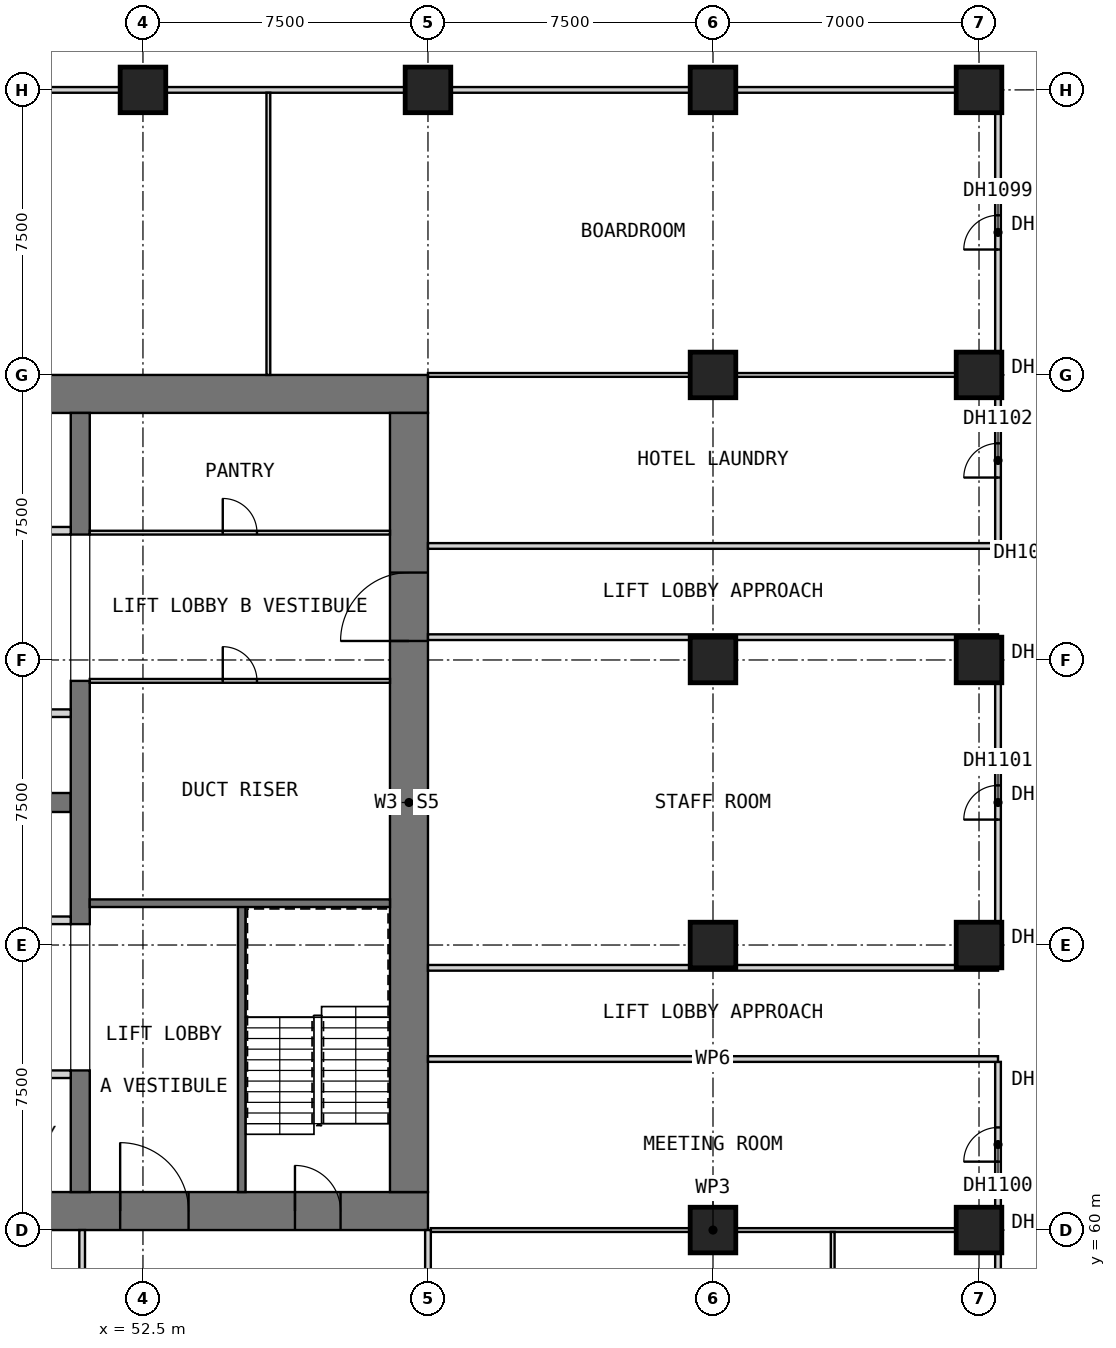
"""IFC4 building model, lengths in metres.
Left out: names, types, materials, properties, quantities, classifications, styles, units other than length and angle.
Written with IfcOpenShell. Run it as: python <this file> out.ifc"""

import sys

from ifc_helpers import new_model, si_unit, direction, frame, frame_2d, origin, origin_2d, place, context, subcontext, project, spatial, rectangle, extrude, element, fill, save


model = new_model("IFC4")
c1 = context("Model", 3, precision=1e-05, world=origin(), true_north=direction((0.0, 1.0)))
c2 = subcontext(c1, "Body", "Model", "MODEL_VIEW")
j1 = project(units=[si_unit("LENGTHUNIT", "METRE"), si_unit("PLANEANGLEUNIT", "RADIAN")], contexts=[c1])
p1 = place(None, origin())
s1 = spatial("IfcSite", under=j1, at=p1, CompositionType="ELEMENT")
p2 = place(p1, origin())
s2 = spatial("IfcBuilding", under=s1, at=p2, CompositionType="ELEMENT")
p3 = place(p2, frame((0.0, 0.0, 48.4)))
s3 = spatial("IfcBuildingStorey", under=s2, at=p3, CompositionType="ELEMENT", Elevation=48.4)
for number, where, z_axis, x_axis in (
    (1, (52.5, 90.0, 0.0), (0.0, 0.0, 1.0), (1.0, 0.0, 0.0)),
    (2, (60.0, 90.0, 0.0), (0.0, 0.0, 1.0), (1.0, 0.0, 0.0)),
    (3, (67.5, 60.0, 0.0), (0.0, 0.0, 1.0), (1.0, 0.0, 0.0)),
    (4, (67.5, 67.5, 0.0), (0.0, 0.0, 1.0), (1.0, 0.0, 0.0)),
    (5, (67.5, 75.0, 0.0), (0.0, 0.0, 1.0), (1.0, 0.0, 0.0)),
    (6, (67.5, 82.5, 0.0), (0.0, 0.0, 1.0), (1.0, 0.0, 0.0)),
    (7, (67.5, 90.0, 0.0), (0.0, 0.0, 1.0), (1.0, 0.0, 0.0)),
    (8, (74.5, 60.0, 0.0), (0.0, 0.0, 1.0), (1.0, 0.0, 0.0)),
    (9, (74.5, 67.5, 0.0), (0.0, 0.0, 1.0), (1.0, 0.0, 0.0)),
    (10, (74.5, 75.0, 0.0), (0.0, 0.0, 1.0), (1.0, 0.0, 0.0)),
    (11, (74.5, 82.5, 0.0), (0.0, 0.0, 1.0), (1.0, 0.0, 0.0)),
    (12, (74.5, 90.0, 0.0), (0.0, 0.0, 1.0), (1.0, 0.0, 0.0)),
):
    element("IfcColumn", number, at=place(p3, frame(where, z_axis=z_axis, x_axis=x_axis)), inside=s3, PredefinedType="COLUMN", context=c2, shape_type="SweptSolid", body=[
        extrude(rectangle(XDim=1.2, YDim=1.2, at=origin_2d()), origin(), (0.0, 0.0, 1.0), 3.6),
    ])
p4 = place(p3, frame((30.0, 60.5, 0.0), z_axis=(0.0, 0.0, 1.0), x_axis=(1.0, 0.0, 0.0)))
e13 = element("IfcWall", 13, at=p4, inside=s3, PredefinedType="SHEAR", context=c2, shape_type="SweptSolid", body=[
    extrude(rectangle(XDim=30.0, YDim=1.0, at=frame_2d((15.0, 0.0))), origin(), (0.0, 0.0, 1.0), 3.6),
])
p5 = place(p4, frame((21.9, 0.0, 0.0)))
e14 = element("IfcOpeningElement", 14, at=p5, cuts=e13, PredefinedType="OPENING", context=c2, shape_type="SweptSolid", body=[
    extrude(rectangle(XDim=1.8, YDim=2.1, at=frame_2d((0.9, 1.05))), frame((0.0, 0.51, 0.0), z_axis=(0.0, -1.0, 0.0), x_axis=(1.0, 0.0, 0.0)), (0.0, 0.0, 1.0), 1.02),
])
p6 = place(p4, frame((26.5, 0.0, 0.0)))
e15 = element("IfcOpeningElement", 15, at=p6, cuts=e13, PredefinedType="OPENING", context=c2, shape_type="SweptSolid", body=[
    extrude(rectangle(XDim=1.2, YDim=2.1, at=frame_2d((0.6, 1.05))), frame((0.0, 0.51, 0.0), z_axis=(0.0, -1.0, 0.0), x_axis=(1.0, 0.0, 0.0)), (0.0, 0.0, 1.0), 1.02),
])
p7 = place(p3, frame((30.0, 82.0, 0.0), z_axis=(0.0, 0.0, 1.0), x_axis=(1.0, 0.0, 0.0)))
e16 = element("IfcWall", 16, at=p7, inside=s3, PredefinedType="SHEAR", context=c2, shape_type="SweptSolid", body=[
    extrude(rectangle(XDim=30.0, YDim=1.0, at=frame_2d((15.0, 0.0))), origin(), (0.0, 0.0, 1.0), 3.6),
])
p8 = place(p3, frame((59.5, 61.0, 0.0), z_axis=(0.0, 0.0, 1.0), x_axis=(0.0, 1.0, 0.0)))
e17 = element("IfcWall", 17, at=p8, inside=s3, PredefinedType="SHEAR", context=c2, shape_type="SweptSolid", body=[
    extrude(rectangle(XDim=20.5, YDim=1.0, at=frame_2d((10.25, 0.0))), origin(), (0.0, 0.0, 1.0), 3.6),
])
p9 = place(p8, frame((14.5, 0.0, 0.0)))
e18 = element("IfcOpeningElement", 18, at=p9, cuts=e17, PredefinedType="OPENING", context=c2, shape_type="SweptSolid", body=[
    extrude(rectangle(XDim=1.8, YDim=2.1, at=frame_2d((0.9, 1.05))), frame((0.0, 0.51, 0.0), z_axis=(0.0, -1.0, 0.0), x_axis=(1.0, 0.0, 0.0)), (0.0, 0.0, 1.0), 1.02),
])
p10 = place(p3, frame((35.0, 71.25, 0.0), z_axis=(0.0, 0.0, 1.0), x_axis=(1.0, 0.0, 0.0)))
e19 = element("IfcWall", 19, at=p10, inside=s3, PredefinedType="SHEAR", context=c2, shape_type="SweptSolid", body=[
    extrude(rectangle(XDim=15.6, YDim=0.5, at=frame_2d((7.8, 0.0))), origin(), (0.0, 0.0, 1.0), 3.6),
])
p11 = place(p3, frame((50.85, 61.0, 0.0), z_axis=(0.0, 0.0, 1.0), x_axis=(0.0, 1.0, 0.0)))
e20 = element("IfcWall", 20, at=p11, inside=s3, PredefinedType="SHEAR", context=c2, shape_type="SweptSolid", body=[
    extrude(rectangle(XDim=3.2, YDim=0.5, at=frame_2d((1.6, 0.0))), origin(), (0.0, 0.0, 1.0), 3.6),
])
p12 = place(p3, frame((50.85, 68.05, 0.0), z_axis=(0.0, 0.0, 1.0), x_axis=(0.0, 1.0, 0.0)))
e21 = element("IfcWall", 21, at=p12, inside=s3, PredefinedType="SHEAR", context=c2, shape_type="SweptSolid", body=[
    extrude(rectangle(XDim=6.4, YDim=0.5, at=frame_2d((3.2, 0.0))), origin(), (0.0, 0.0, 1.0), 3.6),
])
p13 = place(p3, frame((50.85, 78.3, 0.0), z_axis=(0.0, 0.0, 1.0), x_axis=(0.0, 1.0, 0.0)))
e22 = element("IfcWall", 22, at=p13, inside=s3, PredefinedType="SHEAR", context=c2, shape_type="SweptSolid", body=[
    extrude(rectangle(XDim=3.2, YDim=0.5, at=frame_2d((1.6, 0.0))), origin(), (0.0, 0.0, 1.0), 3.6),
])
p14 = place(p3, frame((48.0, 64.1, 0.0), z_axis=(0.0, 0.0, 1.0), x_axis=(1.0, 0.0, 0.0)))
e23 = element("IfcWall", 23, at=p14, inside=s3, PredefinedType="PARTITIONING", context=c2, shape_type="SweptSolid", body=[
    extrude(rectangle(XDim=2.6, YDim=0.2, at=frame_2d((1.3, 0.0))), origin(), (0.0, 0.0, 1.0), 3.35),
])
p15 = place(p14, frame((0.85, 0.0, 0.0)))
e24 = element("IfcOpeningElement", 24, at=p15, cuts=e23, PredefinedType="OPENING", context=c2, shape_type="SweptSolid", body=[
    extrude(rectangle(XDim=0.9, YDim=2.1, at=frame_2d((0.45, 1.05))), frame((0.0, 0.11, 0.0), z_axis=(0.0, -1.0, 0.0), x_axis=(1.0, 0.0, 0.0)), (0.0, 0.0, 1.0), 0.22),
])
p16 = place(p3, frame((48.0, 68.15, 0.0), z_axis=(0.0, 0.0, 1.0), x_axis=(1.0, 0.0, 0.0)))
e25 = element("IfcWall", 25, at=p16, inside=s3, PredefinedType="PARTITIONING", context=c2, shape_type="SweptSolid", body=[
    extrude(rectangle(XDim=2.6, YDim=0.2, at=frame_2d((1.3, 0.0))), origin(), (0.0, 0.0, 1.0), 3.35),
])
p17 = place(p16, frame((0.85, 0.0, 0.0)))
e26 = element("IfcOpeningElement", 26, at=p17, cuts=e25, PredefinedType="OPENING", context=c2, shape_type="SweptSolid", body=[
    extrude(rectangle(XDim=0.9, YDim=2.1, at=frame_2d((0.45, 1.05))), frame((0.0, 0.11, 0.0), z_axis=(0.0, -1.0, 0.0), x_axis=(1.0, 0.0, 0.0)), (0.0, 0.0, 1.0), 0.22),
])
p18 = place(p3, frame((35.0, 73.6, 0.0), z_axis=(0.0, 0.0, 1.0), x_axis=(1.0, 0.0, 0.0)))
e27 = element("IfcWall", 27, at=p18, inside=s3, PredefinedType="PARTITIONING", context=c2, shape_type="SweptSolid", body=[
    extrude(rectangle(XDim=15.6, YDim=0.2, at=frame_2d((7.8, 0.0))), origin(), (0.0, 0.0, 1.0), 3.35),
])
p19 = place(p18, frame((3.45, 0.0, 0.0)))
e28 = element("IfcOpeningElement", 28, at=p19, cuts=e27, PredefinedType="OPENING", context=c2, shape_type="SweptSolid", body=[
    extrude(rectangle(XDim=0.9, YDim=2.1, at=frame_2d((0.45, 1.05))), frame((0.0, 0.11, 0.0), z_axis=(0.0, -1.0, 0.0), x_axis=(1.0, 0.0, 0.0)), (0.0, 0.0, 1.0), 0.22),
])
p20 = place(p18, frame((11.25, 0.0, 0.0)))
e29 = element("IfcOpeningElement", 29, at=p20, cuts=e27, PredefinedType="OPENING", context=c2, shape_type="SweptSolid", body=[
    extrude(rectangle(XDim=0.9, YDim=2.1, at=frame_2d((0.45, 1.05))), frame((0.0, 0.11, 0.0), z_axis=(0.0, -1.0, 0.0), x_axis=(1.0, 0.0, 0.0)), (0.0, 0.0, 1.0), 0.22),
])
p21 = place(p3, frame((35.0, 78.4, 0.0), z_axis=(0.0, 0.0, 1.0), x_axis=(1.0, 0.0, 0.0)))
e30 = element("IfcWall", 30, at=p21, inside=s3, PredefinedType="SOLIDWALL", context=c2, shape_type="SweptSolid", body=[
    extrude(rectangle(XDim=15.6, YDim=0.2, at=frame_2d((7.8, 0.0))), origin(), (0.0, 0.0, 1.0), 3.6),
])
p22 = place(p21, frame((0.75, 0.0, 0.0)))
e31 = element("IfcOpeningElement", 31, at=p22, cuts=e30, PredefinedType="OPENING", context=c2, shape_type="SweptSolid", body=[
    extrude(rectangle(XDim=1.1, YDim=2.1, at=frame_2d((0.55, 1.05))), frame((0.0, 0.11, 0.0), z_axis=(0.0, -1.0, 0.0), x_axis=(1.0, 0.0, 0.0)), (0.0, 0.0, 1.0), 0.22),
])
p23 = place(p21, frame((3.35, 0.0, 0.0)))
e32 = element("IfcOpeningElement", 32, at=p23, cuts=e30, PredefinedType="OPENING", context=c2, shape_type="SweptSolid", body=[
    extrude(rectangle(XDim=1.1, YDim=2.1, at=frame_2d((0.55, 1.05))), frame((0.0, 0.11, 0.0), z_axis=(0.0, -1.0, 0.0), x_axis=(1.0, 0.0, 0.0)), (0.0, 0.0, 1.0), 0.22),
])
p24 = place(p21, frame((11.15, 0.0, 0.0)))
e33 = element("IfcOpeningElement", 33, at=p24, cuts=e30, PredefinedType="OPENING", context=c2, shape_type="SweptSolid", body=[
    extrude(rectangle(XDim=1.1, YDim=2.1, at=frame_2d((0.55, 1.05))), frame((0.0, 0.11, 0.0), z_axis=(0.0, -1.0, 0.0), x_axis=(1.0, 0.0, 0.0)), (0.0, 0.0, 1.0), 0.22),
])
p25 = place(p21, frame((13.75, 0.0, 0.0)))
e34 = element("IfcOpeningElement", 34, at=p25, cuts=e30, PredefinedType="OPENING", context=c2, shape_type="SweptSolid", body=[
    extrude(rectangle(XDim=1.1, YDim=2.1, at=frame_2d((0.55, 1.05))), frame((0.0, 0.11, 0.0), z_axis=(0.0, -1.0, 0.0), x_axis=(1.0, 0.0, 0.0)), (0.0, 0.0, 1.0), 0.22),
])
p26 = place(p3, frame((55.1, 61.0, 0.0), z_axis=(0.0, 0.0, 1.0), x_axis=(0.0, 1.0, 0.0)))
e35 = element("IfcWall", 35, at=p26, inside=s3, PredefinedType="SOLIDWALL", context=c2, shape_type="SweptSolid", body=[
    extrude(rectangle(XDim=7.6, YDim=0.2, at=frame_2d((3.8, 0.0))), origin(), (0.0, 0.0, 1.0), 3.35),
])
p27 = place(p3, frame((51.1, 68.6, 0.0), z_axis=(0.0, 0.0, 1.0), x_axis=(1.0, 0.0, 0.0)))
e36 = element("IfcWall", 36, at=p27, inside=s3, PredefinedType="SOLIDWALL", context=c2, shape_type="SweptSolid", body=[
    extrude(rectangle(XDim=7.9, YDim=0.2, at=frame_2d((3.95, 0.0))), origin(), (0.0, 0.0, 1.0), 3.35),
])
p28 = place(p3, frame((51.1, 74.45, 0.0), z_axis=(0.0, 0.0, 1.0), x_axis=(1.0, 0.0, 0.0)))
e37 = element("IfcWall", 37, at=p28, inside=s3, PredefinedType="PARTITIONING", context=c2, shape_type="SweptSolid", body=[
    extrude(rectangle(XDim=7.9, YDim=0.1, at=frame_2d((3.95, 0.0))), origin(), (0.0, 0.0, 1.0), 3.35),
])
p29 = place(p28, frame((3.5, 0.0, 0.0)))
e38 = element("IfcOpeningElement", 38, at=p29, cuts=e37, PredefinedType="OPENING", context=c2, shape_type="SweptSolid", body=[
    extrude(rectangle(XDim=0.9, YDim=2.1, at=frame_2d((0.45, 1.05))), frame((0.0, 0.06, 0.0), z_axis=(0.0, -1.0, 0.0), x_axis=(1.0, 0.0, 0.0)), (0.0, 0.0, 1.0), 0.12),
])
p30 = place(p3, frame((51.1, 78.35, 0.0), z_axis=(0.0, 0.0, 1.0), x_axis=(1.0, 0.0, 0.0)))
e39 = element("IfcWall", 39, at=p30, inside=s3, PredefinedType="PARTITIONING", context=c2, shape_type="SweptSolid", body=[
    extrude(rectangle(XDim=7.9, YDim=0.1, at=frame_2d((3.95, 0.0))), origin(), (0.0, 0.0, 1.0), 3.35),
])
p31 = place(p30, frame((3.5, 0.0, 0.0)))
e40 = element("IfcOpeningElement", 40, at=p31, cuts=e39, PredefinedType="OPENING", context=c2, shape_type="SweptSolid", body=[
    extrude(rectangle(XDim=0.9, YDim=2.1, at=frame_2d((0.45, 1.05))), frame((0.0, 0.06, 0.0), z_axis=(0.0, -1.0, 0.0), x_axis=(1.0, 0.0, 0.0)), (0.0, 0.0, 1.0), 0.12),
])
p32 = place(p3, frame((33.75, 90.0, 0.0), z_axis=(0.0, 0.0, 1.0), x_axis=(1.0, 0.0, 0.0)))
e41 = element("IfcWall", 41, at=p32, inside=s3, PredefinedType="PARTITIONING", context=c2, shape_type="SweptSolid", body=[
    extrude(rectangle(XDim=41.25, YDim=0.15, at=frame_2d((20.625, 0.0))), origin(), (0.0, 0.0, 1.0), 3.35),
])
p33 = place(p32, frame((1.425, 0.0, 0.0)))
e42 = element("IfcOpeningElement", 42, at=p33, cuts=e41, PredefinedType="OPENING", context=c2, shape_type="SweptSolid", body=[
    extrude(rectangle(XDim=0.9, YDim=2.1, at=frame_2d((0.45, 1.05))), frame((0.0, 0.085, 0.0), z_axis=(0.0, -1.0, 0.0), x_axis=(1.0, 0.0, 0.0)), (0.0, 0.0, 1.0), 0.17),
])
p34 = place(p32, frame((12.45, 0.0, 0.0)))
e43 = element("IfcOpeningElement", 43, at=p34, cuts=e41, PredefinedType="OPENING", context=c2, shape_type="SweptSolid", body=[
    extrude(rectangle(XDim=0.9, YDim=2.1, at=frame_2d((0.45, 1.05))), frame((0.0, 0.085, 0.0), z_axis=(0.0, -1.0, 0.0), x_axis=(1.0, 0.0, 0.0)), (0.0, 0.0, 1.0), 0.17),
])
p35 = place(p3, frame((75.0, 52.575, 0.0), z_axis=(0.0, 0.0, 1.0), x_axis=(0.0, 1.0, 0.0)))
e44 = element("IfcWall", 44, at=p35, inside=s3, PredefinedType="PARTITIONING", context=c2, shape_type="SweptSolid", body=[
    extrude(rectangle(XDim=11.85, YDim=0.15, at=frame_2d((5.925, 0.0))), origin(), (0.0, 0.0, 1.0), 3.35),
])
p36 = place(p35, frame((9.225, 0.0, 0.0)))
e45 = element("IfcOpeningElement", 45, at=p36, cuts=e44, PredefinedType="OPENING", context=c2, shape_type="SweptSolid", body=[
    extrude(rectangle(XDim=0.9, YDim=2.1, at=frame_2d((0.45, 1.05))), frame((0.0, 0.085, 0.0), z_axis=(0.0, -1.0, 0.0), x_axis=(1.0, 0.0, 0.0)), (0.0, 0.0, 1.0), 0.17),
])
p37 = place(p3, frame((75.0, 66.975, 0.0), z_axis=(0.0, 0.0, 1.0), x_axis=(0.0, 1.0, 0.0)))
e46 = element("IfcWall", 46, at=p37, inside=s3, PredefinedType="PARTITIONING", context=c2, shape_type="SweptSolid", body=[
    extrude(rectangle(XDim=8.55, YDim=0.15, at=frame_2d((4.275, 0.0))), origin(), (0.0, 0.0, 1.0), 3.35),
])
p38 = place(p37, frame((3.825, 0.0, 0.0)))
e47 = element("IfcOpeningElement", 47, at=p38, cuts=e46, PredefinedType="OPENING", context=c2, shape_type="SweptSolid", body=[
    extrude(rectangle(XDim=0.9, YDim=2.1, at=frame_2d((0.45, 1.05))), frame((0.0, 0.085, 0.0), z_axis=(0.0, -1.0, 0.0), x_axis=(1.0, 0.0, 0.0)), (0.0, 0.0, 1.0), 0.17),
])
p39 = place(p3, frame((75.0, 78.075, 0.0), z_axis=(0.0, 0.0, 1.0), x_axis=(0.0, 1.0, 0.0)))
e48 = element("IfcWall", 48, at=p39, inside=s3, PredefinedType="PARTITIONING", context=c2, shape_type="SweptSolid", body=[
    extrude(rectangle(XDim=11.85, YDim=0.15, at=frame_2d((5.925, 0.0))), origin(), (0.0, 0.0, 1.0), 3.35),
])
p40 = place(p39, frame((7.725, 0.0, 0.0)))
e49 = element("IfcOpeningElement", 49, at=p40, cuts=e48, PredefinedType="OPENING", context=c2, shape_type="SweptSolid", body=[
    extrude(rectangle(XDim=0.9, YDim=2.1, at=frame_2d((0.45, 1.05))), frame((0.0, 0.085, 0.0), z_axis=(0.0, -1.0, 0.0), x_axis=(1.0, 0.0, 0.0)), (0.0, 0.0, 1.0), 0.17),
])
p41 = place(p39, frame((1.725, 0.0, 0.0)))
e50 = element("IfcOpeningElement", 50, at=p41, cuts=e48, PredefinedType="OPENING", context=c2, shape_type="SweptSolid", body=[
    extrude(rectangle(XDim=0.9, YDim=2.1, at=frame_2d((0.45, 1.05))), frame((0.0, 0.085, 0.0), z_axis=(0.0, -1.0, 0.0), x_axis=(1.0, 0.0, 0.0)), (0.0, 0.0, 1.0), 0.17),
])
p42 = place(p3, frame((60.075, 60.0, 0.0), z_axis=(0.0, 0.0, 1.0), x_axis=(1.0, 0.0, 0.0)))
e51 = element("IfcWall", 51, at=p42, inside=s3, PredefinedType="PARTITIONING", context=c2, shape_type="SweptSolid", body=[
    extrude(rectangle(XDim=14.85, YDim=0.1, at=frame_2d((7.425, 0.0))), origin(), (0.0, 0.0, 1.0), 3.35),
])
p43 = place(p3, frame((60.0, 82.5, 0.0), z_axis=(0.0, 0.0, 1.0), x_axis=(1.0, 0.0, 0.0)))
e52 = element("IfcWall", 52, at=p43, inside=s3, PredefinedType="PARTITIONING", context=c2, shape_type="SweptSolid", body=[
    extrude(rectangle(XDim=14.925, YDim=0.1, at=frame_2d((7.462, 0.0))), origin(), (0.0, 0.0, 1.0), 3.35),
])
p44 = place(p3, frame((55.8, 82.5, 0.0), z_axis=(0.0, 0.0, 1.0), x_axis=(0.0, 1.0, 0.0)))
e53 = element("IfcWall", 53, at=p44, inside=s3, PredefinedType="PARTITIONING", context=c2, shape_type="SweptSolid", body=[
    extrude(rectangle(XDim=7.425, YDim=0.1, at=frame_2d((3.712, 0.0))), origin(), (0.0, 0.0, 1.0), 3.35),
])
p45 = place(p3, frame((70.65, 52.575, 0.0), z_axis=(0.0, 0.0, 1.0), x_axis=(0.0, 1.0, 0.0)))
e54 = element("IfcWall", 54, at=p45, inside=s3, PredefinedType="PARTITIONING", context=c2, shape_type="SweptSolid", body=[
    extrude(rectangle(XDim=7.375, YDim=0.1, at=frame_2d((3.688, 0.0))), origin(), (0.0, 0.0, 1.0), 3.35),
])
for number, where, z_axis, x_axis in (
    (55, (60.0, 64.5, 0.0), (0.0, 0.0, 1.0), (1.0, 0.0, 0.0)),
    (56, (60.0, 66.9, 0.0), (0.0, 0.0, 1.0), (1.0, 0.0, 0.0)),
    (57, (60.0, 75.6, 0.0), (0.0, 0.0, 1.0), (1.0, 0.0, 0.0)),
    (58, (60.0, 78.0, 0.0), (0.0, 0.0, 1.0), (1.0, 0.0, 0.0)),
):
    element("IfcWall", number, at=place(p3, frame(where, z_axis=z_axis, x_axis=x_axis)), inside=s3, PredefinedType="PARTITIONING", context=c2, shape_type="SweptSolid", body=[
        extrude(rectangle(XDim=15.0, YDim=0.15, at=frame_2d((7.5, 0.0))), origin(), (0.0, 0.0, 1.0), 3.35),
    ])
for number, where, z_axis, x_axis in (
    (59, (50.9, 52.575, 0.0), (0.0, 0.0, 1.0), (0.0, 1.0, 0.0)),
    (60, (60.0, 52.575, 0.0), (0.0, 0.0, 1.0), (0.0, 1.0, 0.0)),
):
    element("IfcWall", number, at=place(p3, frame(where, z_axis=z_axis, x_axis=x_axis)), inside=s3, PredefinedType="PARTITIONING", context=c2, shape_type="SweptSolid", body=[
        extrude(rectangle(XDim=7.425, YDim=0.15, at=frame_2d((3.712, 0.0))), origin(), (0.0, 0.0, 1.0), 3.35),
    ])
p46 = place(p5, origin())
e61 = element("IfcDoor", 61, at=p46, inside=s3, OperationType="DOUBLE_DOOR_SINGLE_SWING", PredefinedType="DOOR", context=c2, shape_type="SweptSolid", body=[
    extrude(rectangle(XDim=1.8, YDim=2.1, at=frame_2d((0.9, 1.05))), frame((0.0, 0.025, 0.0), z_axis=(0.0, -1.0, 0.0), x_axis=(1.0, 0.0, 0.0)), (0.0, 0.0, 1.0), 0.05),
])
fill(e14, e61)
p47 = place(p9, origin())
e62 = element("IfcDoor", 62, at=p47, inside=s3, OperationType="DOUBLE_DOOR_SINGLE_SWING", PredefinedType="DOOR", context=c2, shape_type="SweptSolid", body=[
    extrude(rectangle(XDim=1.8, YDim=2.1, at=frame_2d((0.9, 1.05))), frame((0.0, 0.025, 0.0), z_axis=(0.0, -1.0, 0.0), x_axis=(1.0, 0.0, 0.0)), (0.0, 0.0, 1.0), 0.05),
])
fill(e18, e62)
p48 = place(p6, origin())
e63 = element("IfcDoor", 63, at=p48, inside=s3, OperationType="SINGLE_SWING_LEFT", PredefinedType="DOOR", context=c2, shape_type="SweptSolid", body=[
    extrude(rectangle(XDim=1.2, YDim=2.1, at=frame_2d((0.6, 1.05))), frame((0.0, 0.025, 0.0), z_axis=(0.0, -1.0, 0.0), x_axis=(1.0, 0.0, 0.0)), (0.0, 0.0, 1.0), 0.05),
])
fill(e15, e63)
p49 = place(p29, origin())
e64 = element("IfcDoor", 64, at=p49, inside=s3, OperationType="SINGLE_SWING_RIGHT", PredefinedType="DOOR", context=c2, shape_type="SweptSolid", body=[
    extrude(rectangle(XDim=0.9, YDim=2.1, at=frame_2d((0.45, 1.05))), frame((0.0, 0.025, 0.0), z_axis=(0.0, -1.0, 0.0), x_axis=(1.0, 0.0, 0.0)), (0.0, 0.0, 1.0), 0.05),
])
fill(e38, e64)
p50 = place(p31, origin())
e65 = element("IfcDoor", 65, at=p50, inside=s3, OperationType="SINGLE_SWING_RIGHT", PredefinedType="DOOR", context=c2, shape_type="SweptSolid", body=[
    extrude(rectangle(XDim=0.9, YDim=2.1, at=frame_2d((0.45, 1.05))), frame((0.0, 0.025, 0.0), z_axis=(0.0, -1.0, 0.0), x_axis=(1.0, 0.0, 0.0)), (0.0, 0.0, 1.0), 0.05),
])
fill(e40, e65)
p51 = place(p40, origin())
e66 = element("IfcDoor", 66, at=p51, inside=s3, OperationType="SINGLE_SWING_LEFT", PredefinedType="DOOR", context=c2, shape_type="SweptSolid", body=[
    extrude(rectangle(XDim=0.9, YDim=2.1, at=frame_2d((0.45, 1.05))), frame((0.0, 0.025, 0.0), z_axis=(0.0, -1.0, 0.0), x_axis=(1.0, 0.0, 0.0)), (0.0, 0.0, 1.0), 0.05),
])
fill(e49, e66)
p52 = place(p36, origin())
e67 = element("IfcDoor", 67, at=p52, inside=s3, OperationType="SINGLE_SWING_LEFT", PredefinedType="DOOR", context=c2, shape_type="SweptSolid", body=[
    extrude(rectangle(XDim=0.9, YDim=2.1, at=frame_2d((0.45, 1.05))), frame((0.0, 0.025, 0.0), z_axis=(0.0, -1.0, 0.0), x_axis=(1.0, 0.0, 0.0)), (0.0, 0.0, 1.0), 0.05),
])
fill(e45, e67)
p53 = place(p38, origin())
e68 = element("IfcDoor", 68, at=p53, inside=s3, OperationType="SINGLE_SWING_LEFT", PredefinedType="DOOR", context=c2, shape_type="SweptSolid", body=[
    extrude(rectangle(XDim=0.9, YDim=2.1, at=frame_2d((0.45, 1.05))), frame((0.0, 0.025, 0.0), z_axis=(0.0, -1.0, 0.0), x_axis=(1.0, 0.0, 0.0)), (0.0, 0.0, 1.0), 0.05),
])
fill(e47, e68)
p54 = place(p41, origin())
e69 = element("IfcDoor", 69, at=p54, inside=s3, OperationType="SINGLE_SWING_LEFT", PredefinedType="DOOR", context=c2, shape_type="SweptSolid", body=[
    extrude(rectangle(XDim=0.9, YDim=2.1, at=frame_2d((0.45, 1.05))), frame((0.0, 0.025, 0.0), z_axis=(0.0, -1.0, 0.0), x_axis=(1.0, 0.0, 0.0)), (0.0, 0.0, 1.0), 0.05),
])
fill(e50, e69)
save(model, sys.argv[1])
